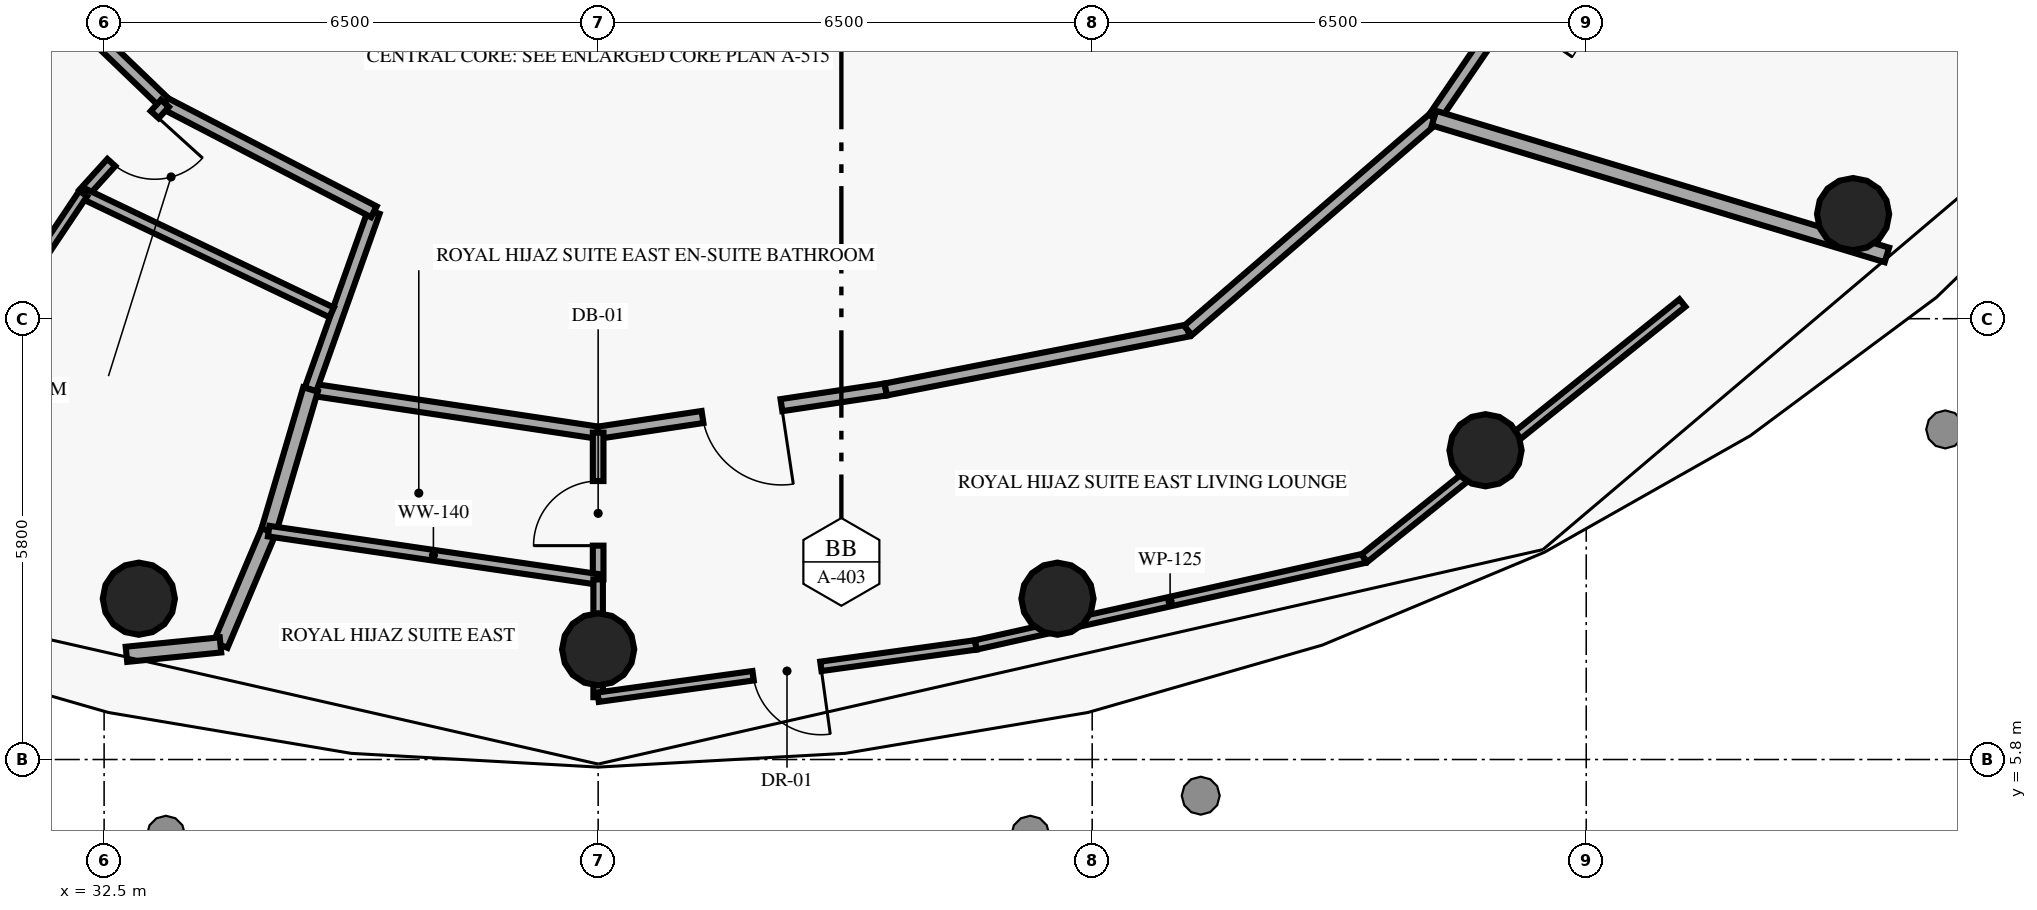
"""IFC4 building model, lengths in metres.
Left out: names, types, materials, properties, quantities, classifications, styles, units other than length and angle.
Written with IfcOpenShell. Run it as: python <this file> out.ifc"""

import sys

from ifc_helpers import new_model, si_unit, direction, frame, frame_2d, origin, origin_2d, place, context, subcontext, project, spatial, rectangle, circle, extrude, element, fill, save


model = new_model("IFC4")
c1 = context("Model", 3, precision=1e-05, world=origin(), true_north=direction((0.0, 1.0)))
c2 = subcontext(c1, "Body", "Model", "MODEL_VIEW")
j1 = project(units=[si_unit("LENGTHUNIT", "METRE"), si_unit("PLANEANGLEUNIT", "RADIAN")], contexts=[c1])
p1 = place(None, origin())
s1 = spatial("IfcSite", under=j1, at=p1, CompositionType="ELEMENT")
p2 = place(p1, origin())
s2 = spatial("IfcBuilding", under=s1, at=p2, CompositionType="ELEMENT")
p3 = place(p2, frame((0.0, 0.0, 192.25)))
s3 = spatial("IfcBuildingStorey", under=s2, at=p3, CompositionType="ELEMENT", Elevation=192.25)
for number, where, z_axis, x_axis in (
    (1, (32.957, 7.916, 0.0), (0.0, 0.0, 1.0), (1.0, 0.0, 0.0)),
    (2, (39.0, 7.25, 0.0), (0.0, 0.0, 1.0), (1.0, 0.0, 0.0)),
    (3, (45.043, 7.916, 0.0), (0.0, 0.0, 1.0), (1.0, 0.0, 0.0)),
    (4, (50.675, 9.869, 0.0), (0.0, 0.0, 1.0), (1.0, 0.0, 0.0)),
    (5, (55.511, 12.976, 0.0), (0.0, 0.0, 1.0), (1.0, 0.0, 0.0)),
):
    element("IfcColumn", number, at=place(p3, frame(where, z_axis=z_axis, x_axis=x_axis)), inside=s3, PredefinedType="COLUMN", context=c2, shape_type="SweptSolid", body=[
        extrude(circle(Radius=0.475, at=origin_2d()), origin(), (0.0, 0.0, 1.0), 3.35),
    ])
p4 = place(p3, frame((35.216, 10.669, 0.0), z_axis=(0.0, 0.0, 1.0), x_axis=(0.988888097148, -0.148661801817, 0.0)))
e6 = element("IfcWall", 6, at=p4, inside=s3, PredefinedType="PARTITIONING", context=c2, shape_type="SweptSolid", body=[
    extrude(rectangle(XDim=3.826, YDim=0.16, at=frame_2d((1.913, 0.0))), origin(), (0.0, 0.0, 1.0), 3.35),
])
p5 = place(p3, frame((42.784, 10.669, 0.0), z_axis=(0.0, 0.0, 1.0), x_axis=(-0.988888097148, -0.148661801817, 0.0)))
e7 = element("IfcWall", 7, at=p5, inside=s3, PredefinedType="PARTITIONING", context=c2, shape_type="SweptSolid", body=[
    extrude(rectangle(XDim=3.826, YDim=0.16, at=frame_2d((1.913, 0.0))), origin(), (0.0, 0.0, 1.0), 3.35),
])
p6 = place(p5, frame((1.388, 0.0, 0.0)))
e8 = element("IfcOpeningElement", 8, at=p6, cuts=e7, PredefinedType="OPENING", context=c2, shape_type="SweptSolid", body=[
    extrude(rectangle(XDim=1.05, YDim=2.15, at=frame_2d((0.525, 1.075))), frame((0.0, 0.09, 0.0), z_axis=(0.0, -1.0, 0.0), x_axis=(1.0, 0.0, 0.0)), (0.0, 0.0, 1.0), 0.18),
])
p7 = place(p3, frame((42.784, 10.669, 0.0), z_axis=(0.0, 0.0, 1.0), x_axis=(0.981485343451, 0.191537256405, 0.0)))
e9 = element("IfcWall", 9, at=p7, inside=s3, PredefinedType="PARTITIONING", context=c2, shape_type="SweptSolid", body=[
    extrude(rectangle(XDim=4.052, YDim=0.16, at=frame_2d((2.026, 0.0))), origin(), (0.0, 0.0, 1.0), 3.35),
])
p8 = place(p3, frame((46.761, 11.445, 0.0), z_axis=(0.0, 0.0, 1.0), x_axis=(0.756921867837, 0.653505383291, 0.0)))
e10 = element("IfcWall", 10, at=p8, inside=s3, PredefinedType="PARTITIONING", context=c2, shape_type="SweptSolid", body=[
    extrude(rectangle(XDim=4.275, YDim=0.16, at=frame_2d((2.138, 0.0))), origin(), (0.0, 0.0, 1.0), 3.35),
])
p9 = place(p3, frame((52.496, 17.899, 0.0), z_axis=(0.0, 0.0, 1.0), x_axis=(-0.563895671103, -0.825846034144, 0.0)))
e11 = element("IfcWall", 11, at=p9, inside=s3, PredefinedType="PARTITIONING", context=c2, shape_type="SweptSolid", body=[
    extrude(rectangle(XDim=4.432, YDim=0.16, at=frame_2d((2.216, 0.0))), origin(), (0.0, 0.0, 1.0), 3.35),
])
p10 = place(p9, frame((1.691, 0.0, 0.0)))
e12 = element("IfcOpeningElement", 12, at=p10, cuts=e11, PredefinedType="OPENING", context=c2, shape_type="SweptSolid", body=[
    extrude(rectangle(XDim=1.05, YDim=2.15, at=frame_2d((0.525, 1.075))), frame((0.0, 0.09, 0.0), z_axis=(0.0, -1.0, 0.0), x_axis=(1.0, 0.0, 0.0)), (0.0, 0.0, 1.0), 0.18),
])
p11 = place(p3, frame((36.049, 13.007, 0.0), z_axis=(0.0, 0.0, 1.0), x_axis=(-0.335607268638, -0.942001996408, 0.0)))
e13 = element("IfcWall", 13, at=p11, inside=s3, PredefinedType="PARTITIONING", context=c2, shape_type="SweptSolid", body=[
    extrude(rectangle(XDim=2.482, YDim=0.16, at=frame_2d((1.241, 0.0))), origin(), (0.0, 0.0, 1.0), 3.35),
])
p12 = place(p3, frame((35.216, 10.669, 0.0), z_axis=(0.0, 0.0, 1.0), x_axis=(-0.283485285535, -0.958976586203, 0.0)))
e14 = element("IfcWall", 14, at=p12, inside=s3, PredefinedType="PARTITIONING", context=c2, shape_type="SweptSolid", body=[
    extrude(rectangle(XDim=1.944, YDim=0.2, at=frame_2d((0.972, 0.0))), origin(), (0.0, 0.0, 1.0), 3.35),
])
p13 = place(p3, frame((34.665, 8.805, 0.0), z_axis=(0.0, 0.0, 1.0), x_axis=(-0.39003681134, -0.920799264661, 0.0)))
e15 = element("IfcWall", 15, at=p13, inside=s3, PredefinedType="PARTITIONING", context=c2, shape_type="SweptSolid", body=[
    extrude(rectangle(XDim=1.625, YDim=0.2, at=frame_2d((0.813, 0.0))), origin(), (0.0, 0.0, 1.0), 3.35),
])
p14 = place(p3, frame((34.031, 7.308, 0.0), z_axis=(0.0, 0.0, 1.0), x_axis=(-0.995011882632, -0.09975647057, 0.0)))
e16 = element("IfcWall", 16, at=p14, inside=s3, PredefinedType="PARTITIONING", context=c2, shape_type="SweptSolid", body=[
    extrude(rectangle(XDim=1.243, YDim=0.2, at=frame_2d((0.622, 0.0))), origin(), (0.0, 0.0, 1.0), 3.35),
])
p15 = place(p3, frame((39.0, 10.1, 0.0), z_axis=(0.0, 0.0, 1.0), x_axis=(0.0, -1.0, 0.0)))
e17 = element("IfcWall", 17, at=p15, inside=s3, PredefinedType="PARTITIONING", context=c2, shape_type="SweptSolid", body=[
    extrude(rectangle(XDim=1.93, YDim=0.14, at=frame_2d((0.965, 0.0))), origin(), (0.0, 0.0, 1.0), 2.415),
])
p16 = place(p15, frame((0.636, 0.0, 0.0)))
e18 = element("IfcOpeningElement", 18, at=p16, cuts=e17, PredefinedType="OPENING", context=c2, shape_type="SweptSolid", body=[
    extrude(rectangle(XDim=0.85, YDim=2.1, at=frame_2d((0.425, 1.05))), frame((0.0, 0.08, 0.0), z_axis=(0.0, -1.0, 0.0), x_axis=(1.0, 0.0, 0.0)), (0.0, 0.0, 1.0), 0.16),
])
p17 = place(p3, frame((34.665, 8.805, 0.0), z_axis=(0.0, 0.0, 1.0), x_axis=(0.989440607964, -0.144938895095, 0.0)))
e19 = element("IfcWall", 19, at=p17, inside=s3, PredefinedType="PARTITIONING", context=c2, shape_type="SweptSolid", body=[
    extrude(rectangle(XDim=4.381, YDim=0.14, at=frame_2d((2.19, 0.0))), origin(), (0.0, 0.0, 1.0), 3.35),
])
p18 = place(p3, frame((39.0, 8.17, 0.0), z_axis=(0.0, 0.0, 1.0), x_axis=(0.0, -1.0, 0.0)))
e20 = element("IfcWall", 20, at=p18, inside=s3, PredefinedType="PARTITIONING", context=c2, shape_type="SweptSolid", body=[
    extrude(rectangle(XDim=0.929, YDim=0.125, at=frame_2d((0.464, 0.0))), origin(), (0.0, 0.0, 1.0), 2.415),
])
p19 = place(p3, frame((39.0, 7.241, 0.0), z_axis=(0.0, 0.0, 1.0), x_axis=(0.0, -1.0, 0.0)))
e21 = element("IfcWall", 21, at=p19, inside=s3, PredefinedType="PARTITIONING", context=c2, shape_type="SweptSolid", body=[
    extrude(rectangle(XDim=0.621, YDim=0.125, at=frame_2d((0.311, 0.0))), origin(), (0.0, 0.0, 1.0), 3.35),
])
p20 = place(p3, frame((43.969, 7.308, 0.0), z_axis=(0.0, 0.0, 1.0), x_axis=(-0.99055057881, -0.13714791584, 0.0)))
e22 = element("IfcWall", 22, at=p20, inside=s3, PredefinedType="PARTITIONING", context=c2, shape_type="SweptSolid", body=[
    extrude(rectangle(XDim=5.016, YDim=0.125, at=frame_2d((2.508, 0.0))), origin(), (0.0, 0.0, 1.0), 3.35),
])
p21 = place(p20, frame((2.058, 0.0, 0.0)))
e23 = element("IfcOpeningElement", 23, at=p21, cuts=e22, PredefinedType="OPENING", context=c2, shape_type="SweptSolid", body=[
    extrude(rectangle(XDim=0.9, YDim=2.1, at=frame_2d((0.45, 1.05))), frame((0.0, 0.073, 0.0), z_axis=(0.0, -1.0, 0.0), x_axis=(1.0, 0.0, 0.0)), (0.0, 0.0, 1.0), 0.145),
])
p22 = place(p3, frame((43.969, 7.308, 0.0), z_axis=(0.0, 0.0, 1.0), x_axis=(0.976029965956, 0.21763617704, 0.0)))
e24 = element("IfcWall", 24, at=p22, inside=s3, PredefinedType="PARTITIONING", context=c2, shape_type="SweptSolid", body=[
    extrude(rectangle(XDim=5.238, YDim=0.125, at=frame_2d((2.619, 0.0))), origin(), (0.0, 0.0, 1.0), 3.35),
])
p23 = place(p3, frame((49.081, 8.448, 0.0), z_axis=(0.0, 0.0, 1.0), x_axis=(0.779800892582, 0.626027609558, 0.0)))
e25 = element("IfcWall", 25, at=p23, inside=s3, PredefinedType="PARTITIONING", context=c2, shape_type="SweptSolid", body=[
    extrude(rectangle(XDim=2.121, YDim=0.125, at=frame_2d((1.061, 0.0))), origin(), (0.0, 0.0, 1.0), 3.35),
])
p24 = place(p3, frame((50.735, 9.776, 0.0), z_axis=(0.0, 0.0, 1.0), x_axis=(0.779788382675, 0.626043191997, 0.0)))
e26 = element("IfcWall", 26, at=p24, inside=s3, PredefinedType="PARTITIONING", context=c2, shape_type="SweptSolid", body=[
    extrude(rectangle(XDim=3.244, YDim=0.125, at=frame_2d((1.622, 0.0))), origin(), (0.0, 0.0, 1.0), 2.73),
])
p25 = place(p3, frame((49.997, 14.239, 0.0), z_axis=(0.0, 0.0, 1.0), x_axis=(0.957278355307, -0.289168031534, 0.0)))
e27 = element("IfcWall", 27, at=p25, inside=s3, PredefinedType="PARTITIONING", context=c2, shape_type="SweptSolid", body=[
    extrude(rectangle(XDim=6.225, YDim=0.2, at=frame_2d((3.112, 0.0))), origin(), (0.0, 0.0, 1.0), 3.35),
])
p26 = place(p3, frame((30.939, 16.703, 0.0), z_axis=(0.0, 0.0, 1.0), x_axis=(0.72090897908, -0.693029756851, 0.0)))
e28 = element("IfcWall", 28, at=p26, inside=s3, PredefinedType="PARTITIONING", context=c2, shape_type="SweptSolid", body=[
    extrude(rectangle(XDim=3.275, YDim=0.16, at=frame_2d((1.638, 0.0))), origin(), (0.0, 0.0, 1.0), 3.35),
])
p27 = place(p3, frame((33.3, 14.433, 0.0), z_axis=(0.0, 0.0, 1.0), x_axis=(0.887674575788, -0.460471331898, 0.0)))
e29 = element("IfcWall", 29, at=p27, inside=s3, PredefinedType="PARTITIONING", context=c2, shape_type="SweptSolid", body=[
    extrude(rectangle(XDim=3.097, YDim=0.16, at=frame_2d((1.548, 0.0))), origin(), (0.0, 0.0, 1.0), 3.35),
])
p28 = place(p3, frame((33.3, 14.433, 0.0), z_axis=(0.0, 0.0, 1.0), x_axis=(-0.671556062003, -0.740953747266, 0.0)))
e30 = element("IfcWall", 30, at=p28, inside=s3, PredefinedType="PARTITIONING", context=c2, shape_type="SweptSolid", body=[
    extrude(rectangle(XDim=1.601, YDim=0.14, at=frame_2d((0.8, 0.0))), origin(), (0.0, 0.0, 1.0), 3.35),
])
p29 = place(p28, frame((0.2, 0.0, 0.0)))
e31 = element("IfcOpeningElement", 31, at=p29, cuts=e30, PredefinedType="OPENING", context=c2, shape_type="SweptSolid", body=[
    extrude(rectangle(XDim=0.85, YDim=2.1, at=frame_2d((0.425, 1.05))), frame((0.0, 0.08, 0.0), z_axis=(0.0, -1.0, 0.0), x_axis=(1.0, 0.0, 0.0)), (0.0, 0.0, 1.0), 0.16),
])
p30 = place(p3, frame((32.225, 13.247, 0.0), z_axis=(0.0, 0.0, 1.0), x_axis=(0.902016722043, -0.431701092372, 0.0)))
e32 = element("IfcWall", 32, at=p30, inside=s3, PredefinedType="PARTITIONING", context=c2, shape_type="SweptSolid", body=[
    extrude(rectangle(XDim=3.623, YDim=0.14, at=frame_2d((1.812, 0.0))), origin(), (0.0, 0.0, 1.0), 3.35),
])
p31 = place(p3, frame((32.225, 13.247, 0.0), z_axis=(0.0, 0.0, 1.0), x_axis=(-0.556297850913, -0.830982972791, 0.0)))
e33 = element("IfcWall", 33, at=p31, inside=s3, PredefinedType="PARTITIONING", context=c2, shape_type="SweptSolid", body=[
    extrude(rectangle(XDim=2.22, YDim=0.125, at=frame_2d((1.11, 0.0))), origin(), (0.0, 0.0, 1.0), 3.35),
])
p32 = place(p6, origin())
e34 = element("IfcDoor", 34, at=p32, inside=s3, OperationType="SINGLE_SWING_LEFT", PredefinedType="DOOR", context=c2, shape_type="SweptSolid", body=[
    extrude(rectangle(XDim=1.05, YDim=2.15, at=frame_2d((0.525, 1.075))), frame((0.0, 0.025, 0.0), z_axis=(0.0, -1.0, 0.0), x_axis=(1.0, 0.0, 0.0)), (0.0, 0.0, 1.0), 0.05),
])
fill(e8, e34)
p33 = place(p16, origin())
e35 = element("IfcDoor", 35, at=p33, inside=s3, OperationType="SINGLE_SWING_RIGHT", PredefinedType="DOOR", context=c2, shape_type="SweptSolid", body=[
    extrude(rectangle(XDim=0.85, YDim=2.1, at=frame_2d((0.425, 1.05))), frame((0.0, 0.025, 0.0), z_axis=(0.0, -1.0, 0.0), x_axis=(1.0, 0.0, 0.0)), (0.0, 0.0, 1.0), 0.05),
])
fill(e18, e35)
p34 = place(p21, origin())
e36 = element("IfcDoor", 36, at=p34, inside=s3, OperationType="SINGLE_SWING_LEFT", PredefinedType="DOOR", context=c2, shape_type="SweptSolid", body=[
    extrude(rectangle(XDim=0.9, YDim=2.1, at=frame_2d((0.45, 1.05))), frame((0.0, 0.025, 0.0), z_axis=(0.0, -1.0, 0.0), x_axis=(1.0, 0.0, 0.0)), (0.0, 0.0, 1.0), 0.05),
])
fill(e23, e36)
p35 = place(p29, origin())
e37 = element("IfcDoor", 37, at=p35, inside=s3, OperationType="SINGLE_SWING_LEFT", PredefinedType="DOOR", context=c2, shape_type="SweptSolid", body=[
    extrude(rectangle(XDim=0.85, YDim=2.1, at=frame_2d((0.425, 1.05))), frame((0.0, 0.025, 0.0), z_axis=(0.0, -1.0, 0.0), x_axis=(1.0, 0.0, 0.0)), (0.0, 0.0, 1.0), 0.05),
])
fill(e31, e37)
save(model, sys.argv[1])
